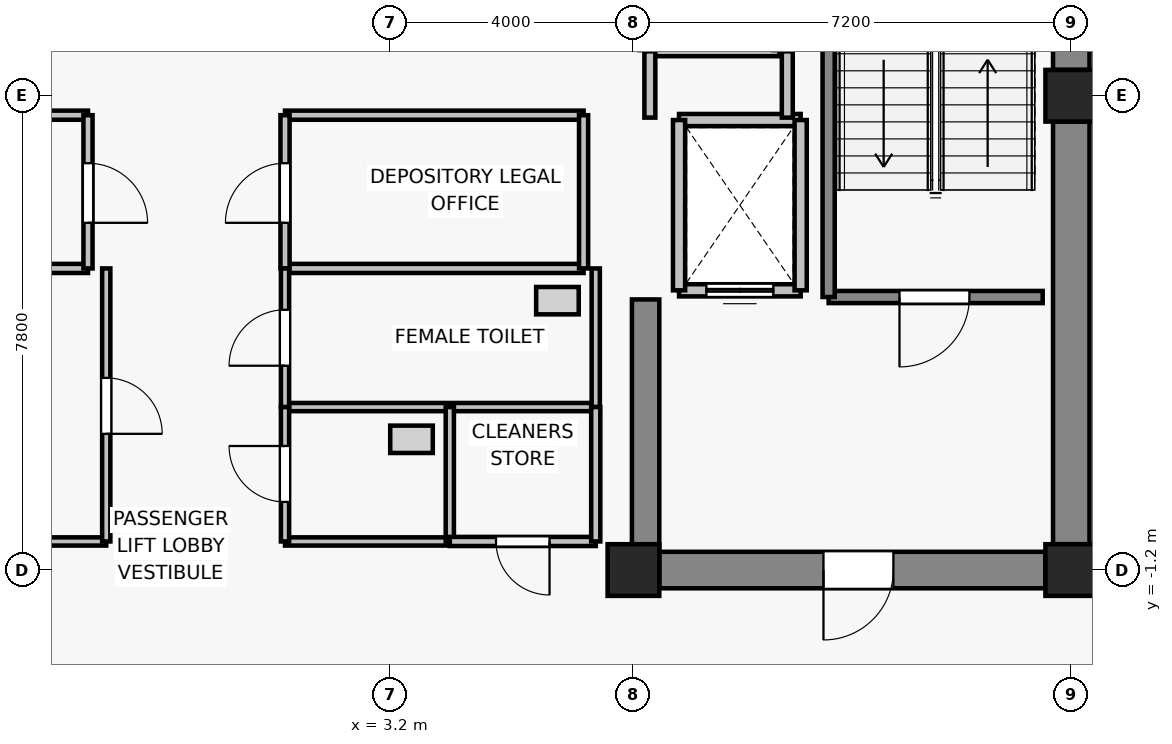
"""IFC4 building model, lengths in metres.
Left out: names, types, materials, properties, quantities, classifications, styles, units other than length and angle.
Written with IfcOpenShell. Run it as: python <this file> out.ifc"""

import sys

from ifc_helpers import new_model, si_unit, direction, frame, frame_2d, origin, origin_2d, place, context, subcontext, project, spatial, rectangle, extrude, source, transform, mapped, element, fill, save


model = new_model("IFC4")
c1 = context("Model", 3, precision=1e-05, world=origin(), true_north=direction((0.0, 1.0)))
c2 = subcontext(c1, "Body", "Model", "MODEL_VIEW")
j1 = project(units=[si_unit("LENGTHUNIT", "METRE"), si_unit("PLANEANGLEUNIT", "RADIAN")], contexts=[c1])
p1 = place(None, origin())
s1 = spatial("IfcSite", under=j1, at=p1, CompositionType="ELEMENT")
p2 = place(p1, origin())
s2 = spatial("IfcBuilding", under=s1, at=p2, CompositionType="ELEMENT")
p3 = place(p2, frame((0.0, 0.0, 232.0)))
s3 = spatial("IfcBuildingStorey", under=s2, at=p3, CompositionType="ELEMENT", Elevation=232.0)
for number, where, z_axis, x_axis in (
    (1, (7.2, -1.2, 0.0), (0.0, 0.0, 1.0), (1.0, 0.0, 0.0)),
    (2, (14.4, -1.2, 0.0), (0.0, 0.0, 1.0), (1.0, 0.0, 0.0)),
    (3, (14.4, 6.6, 0.0), (0.0, 0.0, 1.0), (1.0, 0.0, 0.0)),
):
    element("IfcColumn", number, at=place(p3, frame(where, z_axis=z_axis, x_axis=x_axis)), inside=s3, PredefinedType="COLUMN", context=c2, shape_type="SweptSolid", body=[
        extrude(rectangle(XDim=0.85, YDim=0.85, at=origin_2d()), origin(), (0.0, 0.0, 1.0), 3.3),
    ])
p4 = place(p3, frame((14.4, -0.775, 0.0), z_axis=(0.0, 0.0, 1.0), x_axis=(0.0, 1.0, 0.0)))
e4 = element("IfcWall", 4, at=p4, inside=s3, PredefinedType="SHEAR", context=c2, shape_type="SweptSolid", body=[
    extrude(rectangle(XDim=6.95, YDim=0.6, at=frame_2d((3.475, 0.0))), origin(), (0.0, 0.0, 1.0), 3.075),
])
p5 = place(p3, frame((14.4, 7.025, 0.0), z_axis=(0.0, 0.0, 1.0), x_axis=(0.0, 1.0, 0.0)))
e5 = element("IfcWall", 5, at=p5, inside=s3, PredefinedType="SHEAR", context=c2, shape_type="SweptSolid", body=[
    extrude(rectangle(XDim=6.05, YDim=0.6, at=frame_2d((3.025, 0.0))), origin(), (0.0, 0.0, 1.0), 3.075),
])
p6 = place(p3, frame((13.975, -1.2, 0.0), z_axis=(0.0, 0.0, 1.0), x_axis=(-1.0, 0.0, 0.0)))
e6 = element("IfcWall", 6, at=p6, inside=s3, PredefinedType="SHEAR", context=c2, shape_type="SweptSolid", body=[
    extrude(rectangle(XDim=6.35, YDim=0.6, at=frame_2d((3.175, 0.0))), origin(), (0.0, 0.0, 1.0), 3.075),
])
p7 = place(p6, frame((2.5, 0.0, 0.0)))
e7 = element("IfcOpeningElement", 7, at=p7, cuts=e6, PredefinedType="OPENING", context=c2, shape_type="SweptSolid", body=[
    extrude(rectangle(XDim=1.15, YDim=2.15, at=frame_2d((0.575, 1.075))), frame((0.0, 0.31, 0.0), z_axis=(0.0, -1.0, 0.0), x_axis=(1.0, 0.0, 0.0)), (0.0, 0.0, 1.0), 0.62),
])
p8 = place(p3, frame((7.4, -0.9, 0.0), z_axis=(0.0, 0.0, 1.0), x_axis=(0.0, 1.0, 0.0)))
e8 = element("IfcWall", 8, at=p8, inside=s3, PredefinedType="SHEAR", context=c2, shape_type="SweptSolid", body=[
    extrude(rectangle(XDim=4.15, YDim=0.45, at=frame_2d((2.075, 0.0))), origin(), (0.0, 0.0, 1.0), 3.075),
])
p9 = place(p3, frame((9.95, 3.4, 0.0), z_axis=(0.0, 0.0, 1.0), x_axis=(-1.0, 0.0, 0.0)))
e9 = element("IfcWall", 9, at=p9, inside=s3, PredefinedType="SOLIDWALL", context=c2, shape_type="SweptSolid", body=[
    extrude(rectangle(XDim=2.0, YDim=0.2, at=frame_2d((1.0, 0.0))), origin(), (0.0, 0.0, 1.0), 3.075),
])
p10 = place(p9, frame((0.45, 0.0, 0.0)))
e10 = element("IfcOpeningElement", 10, at=p10, cuts=e9, PredefinedType="OPENING", context=c2, shape_type="SweptSolid", body=[
    extrude(rectangle(XDim=1.1, YDim=2.2, at=frame_2d((0.55, 1.1))), frame((0.0, 0.11, 0.0), z_axis=(0.0, -1.0, 0.0), x_axis=(1.0, 0.0, 0.0)), (0.0, 0.0, 1.0), 0.22),
])
p11 = place(p3, frame((7.95, 6.2, 0.0), z_axis=(0.0, 0.0, 1.0), x_axis=(1.0, 0.0, 0.0)))
e11 = element("IfcWall", 11, at=p11, inside=s3, PredefinedType="SOLIDWALL", context=c2, shape_type="SweptSolid", body=[
    extrude(rectangle(XDim=2.0, YDim=0.2, at=frame_2d((1.0, 0.0))), origin(), (0.0, 0.0, 1.0), 3.075),
])
for number, where, z_axis, x_axis in (
    (12, (7.95, 3.4, 0.0), (0.0, 0.0, 1.0), (0.0, 1.0, 0.0)),
    (13, (9.95, 6.2, 0.0), (0.0, 0.0, 1.0), (0.0, -1.0, 0.0)),
):
    element("IfcWall", number, at=place(p3, frame(where, z_axis=z_axis, x_axis=x_axis)), inside=s3, PredefinedType="SOLIDWALL", context=c2, shape_type="SweptSolid", body=[
        extrude(rectangle(XDim=2.8, YDim=0.2, at=frame_2d((1.4, 0.0))), origin(), (0.0, 0.0, 1.0), 3.075),
    ])
p12 = place(p3, frame((9.6, 7.35, 0.0), z_axis=(0.0, 0.0, 1.0), x_axis=(-1.0, 0.0, 0.0)))
e14 = element("IfcWall", 14, at=p12, inside=s3, PredefinedType="SOLIDWALL", context=c2, shape_type="SweptSolid", body=[
    extrude(rectangle(XDim=2.2, YDim=0.2, at=frame_2d((1.1, 0.0))), origin(), (0.0, 0.0, 1.0), 2.615),
])
p13 = place(p3, frame((13.93, 3.29, 0.0), z_axis=(0.0, 0.0, 1.0), x_axis=(-1.0, 0.0, 0.0)))
e15 = element("IfcWall", 15, at=p13, inside=s3, PredefinedType="SOLIDWALL", context=c2, shape_type="SweptSolid", body=[
    extrude(rectangle(XDim=3.52, YDim=0.2, at=frame_2d((1.76, 0.0))), origin(), (0.0, 0.0, 1.0), 3.075),
])
p14 = place(p13, frame((1.205, 0.0, 0.0)))
e16 = element("IfcOpeningElement", 16, at=p14, cuts=e15, PredefinedType="OPENING", context=c2, shape_type="SweptSolid", body=[
    extrude(rectangle(XDim=1.15, YDim=2.15, at=frame_2d((0.575, 1.075))), frame((0.0, 0.11, 0.0), z_axis=(0.0, -1.0, 0.0), x_axis=(1.0, 0.0, 0.0)), (0.0, 0.0, 1.0), 0.22),
])
p15 = place(p3, frame((10.41, 3.29, 0.0), z_axis=(0.0, 0.0, 1.0), x_axis=(0.0, 1.0, 0.0)))
e17 = element("IfcWall", 17, at=p15, inside=s3, PredefinedType="SOLIDWALL", context=c2, shape_type="SweptSolid", body=[
    extrude(rectangle(XDim=8.84, YDim=0.2, at=frame_2d((4.42, 0.0))), origin(), (0.0, 0.0, 1.0), 3.075),
])
p16 = place(p3, frame((7.47, 6.24, 0.0), z_axis=(0.0, 0.0, 1.0), x_axis=(0.0, 1.0, 0.0)))
e18 = element("IfcWall", 18, at=p16, inside=s3, PredefinedType="PARTITIONING", context=c2, shape_type="SweptSolid", body=[
    extrude(rectangle(XDim=1.09, YDim=0.18, at=frame_2d((0.545, 0.0))), origin(), (0.0, 0.0, 1.0), 2.615),
])
p17 = place(p3, frame((9.73, 7.33, 0.0), z_axis=(0.0, 0.0, 1.0), x_axis=(0.0, -1.0, 0.0)))
e19 = element("IfcWall", 19, at=p17, inside=s3, PredefinedType="PARTITIONING", context=c2, shape_type="SweptSolid", body=[
    extrude(rectangle(XDim=1.09, YDim=0.18, at=frame_2d((0.545, 0.0))), origin(), (0.0, 0.0, 1.0), 3.075),
])
for number, where, z_axis, x_axis in (
    (20, (-1.77, 3.76, 0.0), (0.0, 0.0, 1.0), (-1.0, 0.0, 0.0)),
    (21, (-6.18, 6.28, 0.0), (0.0, 0.0, 1.0), (1.0, 0.0, 0.0)),
):
    element("IfcWall", number, at=place(p3, frame(where, z_axis=z_axis, x_axis=x_axis)), inside=s3, PredefinedType="PARTITIONING", context=c2, shape_type="SweptSolid", body=[
        extrude(rectangle(XDim=4.41, YDim=0.15, at=frame_2d((2.205, 0.0))), origin(), (0.0, 0.0, 1.0), 3.075),
    ])
p18 = place(p3, frame((-1.77, 6.28, 0.0), z_axis=(0.0, 0.0, 1.0), x_axis=(0.0, -1.0, 0.0)))
e22 = element("IfcWall", 22, at=p18, inside=s3, PredefinedType="PARTITIONING", context=c2, shape_type="SweptSolid", body=[
    extrude(rectangle(XDim=2.52, YDim=0.15, at=frame_2d((1.26, 0.0))), origin(), (0.0, 0.0, 1.0), 3.075),
])
p19 = place(p18, frame((0.79, 0.0, 0.0)))
e23 = element("IfcOpeningElement", 23, at=p19, cuts=e22, PredefinedType="OPENING", context=c2, shape_type="SweptSolid", body=[
    extrude(rectangle(XDim=0.98, YDim=2.15, at=frame_2d((0.49, 1.075))), frame((0.0, 0.085, 0.0), z_axis=(0.0, -1.0, 0.0), x_axis=(1.0, 0.0, 0.0)), (0.0, 0.0, 1.0), 0.17),
])
for number, where, z_axis, x_axis in (
    (24, (6.38, 3.76, 0.0), (0.0, 0.0, 1.0), (-1.0, 0.0, 0.0)),
    (25, (1.47, 6.28, 0.0), (0.0, 0.0, 1.0), (1.0, 0.0, 0.0)),
):
    element("IfcWall", number, at=place(p3, frame(where, z_axis=z_axis, x_axis=x_axis)), inside=s3, PredefinedType="PARTITIONING", context=c2, shape_type="SweptSolid", body=[
        extrude(rectangle(XDim=4.91, YDim=0.15, at=frame_2d((2.455, 0.0))), origin(), (0.0, 0.0, 1.0), 3.075),
    ])
p20 = place(p3, frame((1.47, 3.76, 0.0), z_axis=(0.0, 0.0, 1.0), x_axis=(0.0, 1.0, 0.0)))
e26 = element("IfcWall", 26, at=p20, inside=s3, PredefinedType="PARTITIONING", context=c2, shape_type="SweptSolid", body=[
    extrude(rectangle(XDim=2.52, YDim=0.15, at=frame_2d((1.26, 0.0))), origin(), (0.0, 0.0, 1.0), 3.075),
])
p21 = place(p20, frame((0.75, 0.0, 0.0)))
e27 = element("IfcOpeningElement", 27, at=p21, cuts=e26, PredefinedType="OPENING", context=c2, shape_type="SweptSolid", body=[
    extrude(rectangle(XDim=0.98, YDim=2.15, at=frame_2d((0.49, 1.075))), frame((0.0, 0.085, 0.0), z_axis=(0.0, -1.0, 0.0), x_axis=(1.0, 0.0, 0.0)), (0.0, 0.0, 1.0), 0.17),
])
p22 = place(p3, frame((6.38, 6.28, 0.0), z_axis=(0.0, 0.0, 1.0), x_axis=(0.0, -1.0, 0.0)))
e28 = element("IfcWall", 28, at=p22, inside=s3, PredefinedType="PARTITIONING", context=c2, shape_type="SweptSolid", body=[
    extrude(rectangle(XDim=2.52, YDim=0.15, at=frame_2d((1.26, 0.0))), origin(), (0.0, 0.0, 1.0), 3.075),
])
p23 = place(p3, frame((-1.47, -0.73, 0.0), z_axis=(0.0, 0.0, 1.0), x_axis=(-1.0, 0.0, 0.0)))
e29 = element("IfcWall", 29, at=p23, inside=s3, PredefinedType="PARTITIONING", context=c2, shape_type="SweptSolid", body=[
    extrude(rectangle(XDim=5.11, YDim=0.135, at=frame_2d((2.555, 0.0))), origin(), (0.0, 0.0, 1.0), 3.075),
])
p24 = place(p3, frame((-1.47, 3.76, 0.0), z_axis=(0.0, 0.0, 1.0), x_axis=(0.0, -1.0, 0.0)))
e30 = element("IfcWall", 30, at=p24, inside=s3, PredefinedType="PARTITIONING", context=c2, shape_type="SweptSolid", body=[
    extrude(rectangle(XDim=4.49, YDim=0.135, at=frame_2d((2.245, 0.0))), origin(), (0.0, 0.0, 1.0), 3.075),
])
p25 = place(p24, frame((1.8, 0.0, 0.0)))
e31 = element("IfcOpeningElement", 31, at=p25, cuts=e30, PredefinedType="OPENING", context=c2, shape_type="SweptSolid", body=[
    extrude(rectangle(XDim=0.92, YDim=2.1, at=frame_2d((0.46, 1.05))), frame((0.0, 0.077, 0.0), z_axis=(0.0, -1.0, 0.0), x_axis=(1.0, 0.0, 0.0)), (0.0, 0.0, 1.0), 0.155),
])
p26 = place(p3, frame((6.58, 1.48, 0.0), z_axis=(0.0, 0.0, 1.0), x_axis=(-1.0, 0.0, 0.0)))
e32 = element("IfcWall", 32, at=p26, inside=s3, PredefinedType="PARTITIONING", context=c2, shape_type="SweptSolid", body=[
    extrude(rectangle(XDim=5.11, YDim=0.135, at=frame_2d((2.555, 0.0))), origin(), (0.0, 0.0, 1.0), 3.075),
])
p27 = place(p3, frame((1.47, 1.48, 0.0), z_axis=(0.0, 0.0, 1.0), x_axis=(0.0, 1.0, 0.0)))
e33 = element("IfcWall", 33, at=p27, inside=s3, PredefinedType="PARTITIONING", context=c2, shape_type="SweptSolid", body=[
    extrude(rectangle(XDim=2.28, YDim=0.135, at=frame_2d((1.14, 0.0))), origin(), (0.0, 0.0, 1.0), 3.075),
])
p28 = place(p27, frame((0.68, 0.0, 0.0)))
e34 = element("IfcOpeningElement", 34, at=p28, cuts=e33, PredefinedType="OPENING", context=c2, shape_type="SweptSolid", body=[
    extrude(rectangle(XDim=0.92, YDim=2.1, at=frame_2d((0.46, 1.05))), frame((0.0, 0.077, 0.0), z_axis=(0.0, -1.0, 0.0), x_axis=(1.0, 0.0, 0.0)), (0.0, 0.0, 1.0), 0.155),
])
p29 = place(p3, frame((6.58, 3.76, 0.0), z_axis=(0.0, 0.0, 1.0), x_axis=(0.0, -1.0, 0.0)))
e35 = element("IfcWall", 35, at=p29, inside=s3, PredefinedType="PARTITIONING", context=c2, shape_type="SweptSolid", body=[
    extrude(rectangle(XDim=2.28, YDim=0.135, at=frame_2d((1.14, 0.0))), origin(), (0.0, 0.0, 1.0), 3.075),
])
p30 = place(p3, frame((4.18, -0.73, 0.0), z_axis=(0.0, 0.0, 1.0), x_axis=(-1.0, 0.0, 0.0)))
e36 = element("IfcWall", 36, at=p30, inside=s3, PredefinedType="PARTITIONING", context=c2, shape_type="SweptSolid", body=[
    extrude(rectangle(XDim=2.71, YDim=0.135, at=frame_2d((1.355, 0.0))), origin(), (0.0, 0.0, 1.0), 3.075),
])
p31 = place(p3, frame((1.47, -0.73, 0.0), z_axis=(0.0, 0.0, 1.0), x_axis=(0.0, 1.0, 0.0)))
e37 = element("IfcWall", 37, at=p31, inside=s3, PredefinedType="PARTITIONING", context=c2, shape_type="SweptSolid", body=[
    extrude(rectangle(XDim=2.21, YDim=0.135, at=frame_2d((1.105, 0.0))), origin(), (0.0, 0.0, 1.0), 3.075),
])
p32 = place(p31, frame((0.65, 0.0, 0.0)))
e38 = element("IfcOpeningElement", 38, at=p32, cuts=e37, PredefinedType="OPENING", context=c2, shape_type="SweptSolid", body=[
    extrude(rectangle(XDim=0.92, YDim=2.1, at=frame_2d((0.46, 1.05))), frame((0.0, 0.077, 0.0), z_axis=(0.0, -1.0, 0.0), x_axis=(1.0, 0.0, 0.0)), (0.0, 0.0, 1.0), 0.155),
])
p33 = place(p3, frame((4.18, 1.48, 0.0), z_axis=(0.0, 0.0, 1.0), x_axis=(0.0, -1.0, 0.0)))
e39 = element("IfcWall", 39, at=p33, inside=s3, PredefinedType="PARTITIONING", context=c2, shape_type="SweptSolid", body=[
    extrude(rectangle(XDim=2.21, YDim=0.135, at=frame_2d((1.105, 0.0))), origin(), (0.0, 0.0, 1.0), 3.075),
])
p34 = place(p3, frame((6.58, -0.73, 0.0), z_axis=(0.0, 0.0, 1.0), x_axis=(-1.0, 0.0, 0.0)))
e40 = element("IfcWall", 40, at=p34, inside=s3, PredefinedType="PARTITIONING", context=c2, shape_type="SweptSolid", body=[
    extrude(rectangle(XDim=2.4, YDim=0.15, at=frame_2d((1.2, 0.0))), origin(), (0.0, 0.0, 1.0), 3.075),
])
p35 = place(p34, frame((0.76, 0.0, 0.0)))
e41 = element("IfcOpeningElement", 41, at=p35, cuts=e40, PredefinedType="OPENING", context=c2, shape_type="SweptSolid", body=[
    extrude(rectangle(XDim=0.88, YDim=2.1, at=frame_2d((0.44, 1.05))), frame((0.0, 0.085, 0.0), z_axis=(0.0, -1.0, 0.0), x_axis=(1.0, 0.0, 0.0)), (0.0, 0.0, 1.0), 0.17),
])
p36 = place(p3, frame((6.58, 1.48, 0.0), z_axis=(0.0, 0.0, 1.0), x_axis=(0.0, -1.0, 0.0)))
e42 = element("IfcWall", 42, at=p36, inside=s3, PredefinedType="PARTITIONING", context=c2, shape_type="SweptSolid", body=[
    extrude(rectangle(XDim=2.21, YDim=0.15, at=frame_2d((1.105, 0.0))), origin(), (0.0, 0.0, 1.0), 3.075),
])
m1 = source(origin(), c2, "Body", "SweptSolid", [
    extrude(rectangle(XDim=1.1, YDim=2.2, at=frame_2d((0.55, 1.1))), frame((0.0, 0.025, 0.0), z_axis=(0.0, -1.0, 0.0), x_axis=(1.0, 0.0, 0.0)), (0.0, 0.0, 1.0), 0.05),
])
p37 = place(p10, origin())
e43 = element("IfcDoor", 43, at=p37, inside=s3, OperationType="DOUBLE_DOOR_SLIDING", PredefinedType="DOOR", context=c2, shape_type="MappedRepresentation", body=[
    mapped(m1, transform((0.0, 0.0, 0.0), x_axis=(1.0, 0.0, 0.0), y_axis=(0.0, 1.0, 0.0), z_axis=(0.0, 0.0, 1.0), scale=1.0)),
])
fill(e10, e43)
m2 = source(origin(), c2, "Body", "SweptSolid", [
    extrude(rectangle(XDim=1.15, YDim=2.15, at=frame_2d((0.575, 1.075))), frame((0.0, 0.025, 0.0), z_axis=(0.0, -1.0, 0.0), x_axis=(1.0, 0.0, 0.0)), (0.0, 0.0, 1.0), 0.05),
])
p38 = place(p14, origin())
e44 = element("IfcDoor", 44, at=p38, inside=s3, OperationType="SINGLE_SWING_RIGHT", PredefinedType="DOOR", context=c2, shape_type="MappedRepresentation", body=[
    mapped(m2, transform((0.0, 0.0, 0.0), x_axis=(1.0, 0.0, 0.0), y_axis=(0.0, 1.0, 0.0), z_axis=(0.0, 0.0, 1.0), scale=1.0)),
])
fill(e16, e44)
p39 = place(p7, origin())
e45 = element("IfcDoor", 45, at=p39, inside=s3, OperationType="SINGLE_SWING_RIGHT", PredefinedType="DOOR", context=c2, shape_type="MappedRepresentation", body=[
    mapped(m2, transform((0.0, 0.0, 0.0), x_axis=(1.0, 0.0, 0.0), y_axis=(0.0, 1.0, 0.0), z_axis=(0.0, 0.0, 1.0), scale=1.0)),
])
fill(e7, e45)
m3 = source(origin(), c2, "Body", "SweptSolid", [
    extrude(rectangle(XDim=0.98, YDim=2.15, at=frame_2d((0.49, 1.075))), frame((0.0, 0.025, 0.0), z_axis=(0.0, -1.0, 0.0), x_axis=(1.0, 0.0, 0.0)), (0.0, 0.0, 1.0), 0.05),
])
p40 = place(p19, origin())
e46 = element("IfcDoor", 46, at=p40, inside=s3, OperationType="SINGLE_SWING_RIGHT", PredefinedType="DOOR", context=c2, shape_type="MappedRepresentation", body=[
    mapped(m3, transform((0.0, 0.0, 0.0), x_axis=(1.0, 0.0, 0.0), y_axis=(0.0, 1.0, 0.0), z_axis=(0.0, 0.0, 1.0), scale=1.0)),
])
fill(e23, e46)
p41 = place(p21, origin())
e47 = element("IfcDoor", 47, at=p41, inside=s3, OperationType="SINGLE_SWING_LEFT", PredefinedType="DOOR", context=c2, shape_type="MappedRepresentation", body=[
    mapped(m3, transform((0.0, 0.0, 0.0), x_axis=(1.0, 0.0, 0.0), y_axis=(0.0, 1.0, 0.0), z_axis=(0.0, 0.0, 1.0), scale=1.0)),
])
fill(e27, e47)
m4 = source(origin(), c2, "Body", "SweptSolid", [
    extrude(rectangle(XDim=0.92, YDim=2.1, at=frame_2d((0.46, 1.05))), frame((0.0, 0.025, 0.0), z_axis=(0.0, -1.0, 0.0), x_axis=(1.0, 0.0, 0.0)), (0.0, 0.0, 1.0), 0.05),
])
p42 = place(p25, origin())
e48 = element("IfcDoor", 48, at=p42, inside=s3, OperationType="SINGLE_SWING_RIGHT", PredefinedType="DOOR", context=c2, shape_type="MappedRepresentation", body=[
    mapped(m4, transform((0.0, 0.0, 0.0), x_axis=(1.0, 0.0, 0.0), y_axis=(0.0, 1.0, 0.0), z_axis=(0.0, 0.0, 1.0), scale=1.0)),
])
fill(e31, e48)
p43 = place(p28, origin())
e49 = element("IfcDoor", 49, at=p43, inside=s3, OperationType="SINGLE_SWING_LEFT", PredefinedType="DOOR", context=c2, shape_type="MappedRepresentation", body=[
    mapped(m4, transform((0.0, 0.0, 0.0), x_axis=(1.0, 0.0, 0.0), y_axis=(0.0, 1.0, 0.0), z_axis=(0.0, 0.0, 1.0), scale=1.0)),
])
fill(e34, e49)
p44 = place(p32, origin())
e50 = element("IfcDoor", 50, at=p44, inside=s3, OperationType="SINGLE_SWING_RIGHT", PredefinedType="DOOR", context=c2, shape_type="MappedRepresentation", body=[
    mapped(m4, transform((0.0, 0.0, 0.0), x_axis=(1.0, 0.0, 0.0), y_axis=(0.0, 1.0, 0.0), z_axis=(0.0, 0.0, 1.0), scale=1.0)),
])
fill(e38, e50)
m5 = source(origin(), c2, "Body", "SweptSolid", [
    extrude(rectangle(XDim=0.88, YDim=2.1, at=frame_2d((0.44, 1.05))), frame((0.0, 0.025, 0.0), z_axis=(0.0, -1.0, 0.0), x_axis=(1.0, 0.0, 0.0)), (0.0, 0.0, 1.0), 0.05),
])
p45 = place(p35, origin())
e51 = element("IfcDoor", 51, at=p45, inside=s3, OperationType="SINGLE_SWING_LEFT", PredefinedType="DOOR", context=c2, shape_type="MappedRepresentation", body=[
    mapped(m5, transform((0.0, 0.0, 0.0), x_axis=(1.0, 0.0, 0.0), y_axis=(0.0, 1.0, 0.0), z_axis=(0.0, 0.0, 1.0), scale=1.0)),
])
fill(e41, e51)
save(model, sys.argv[1])
